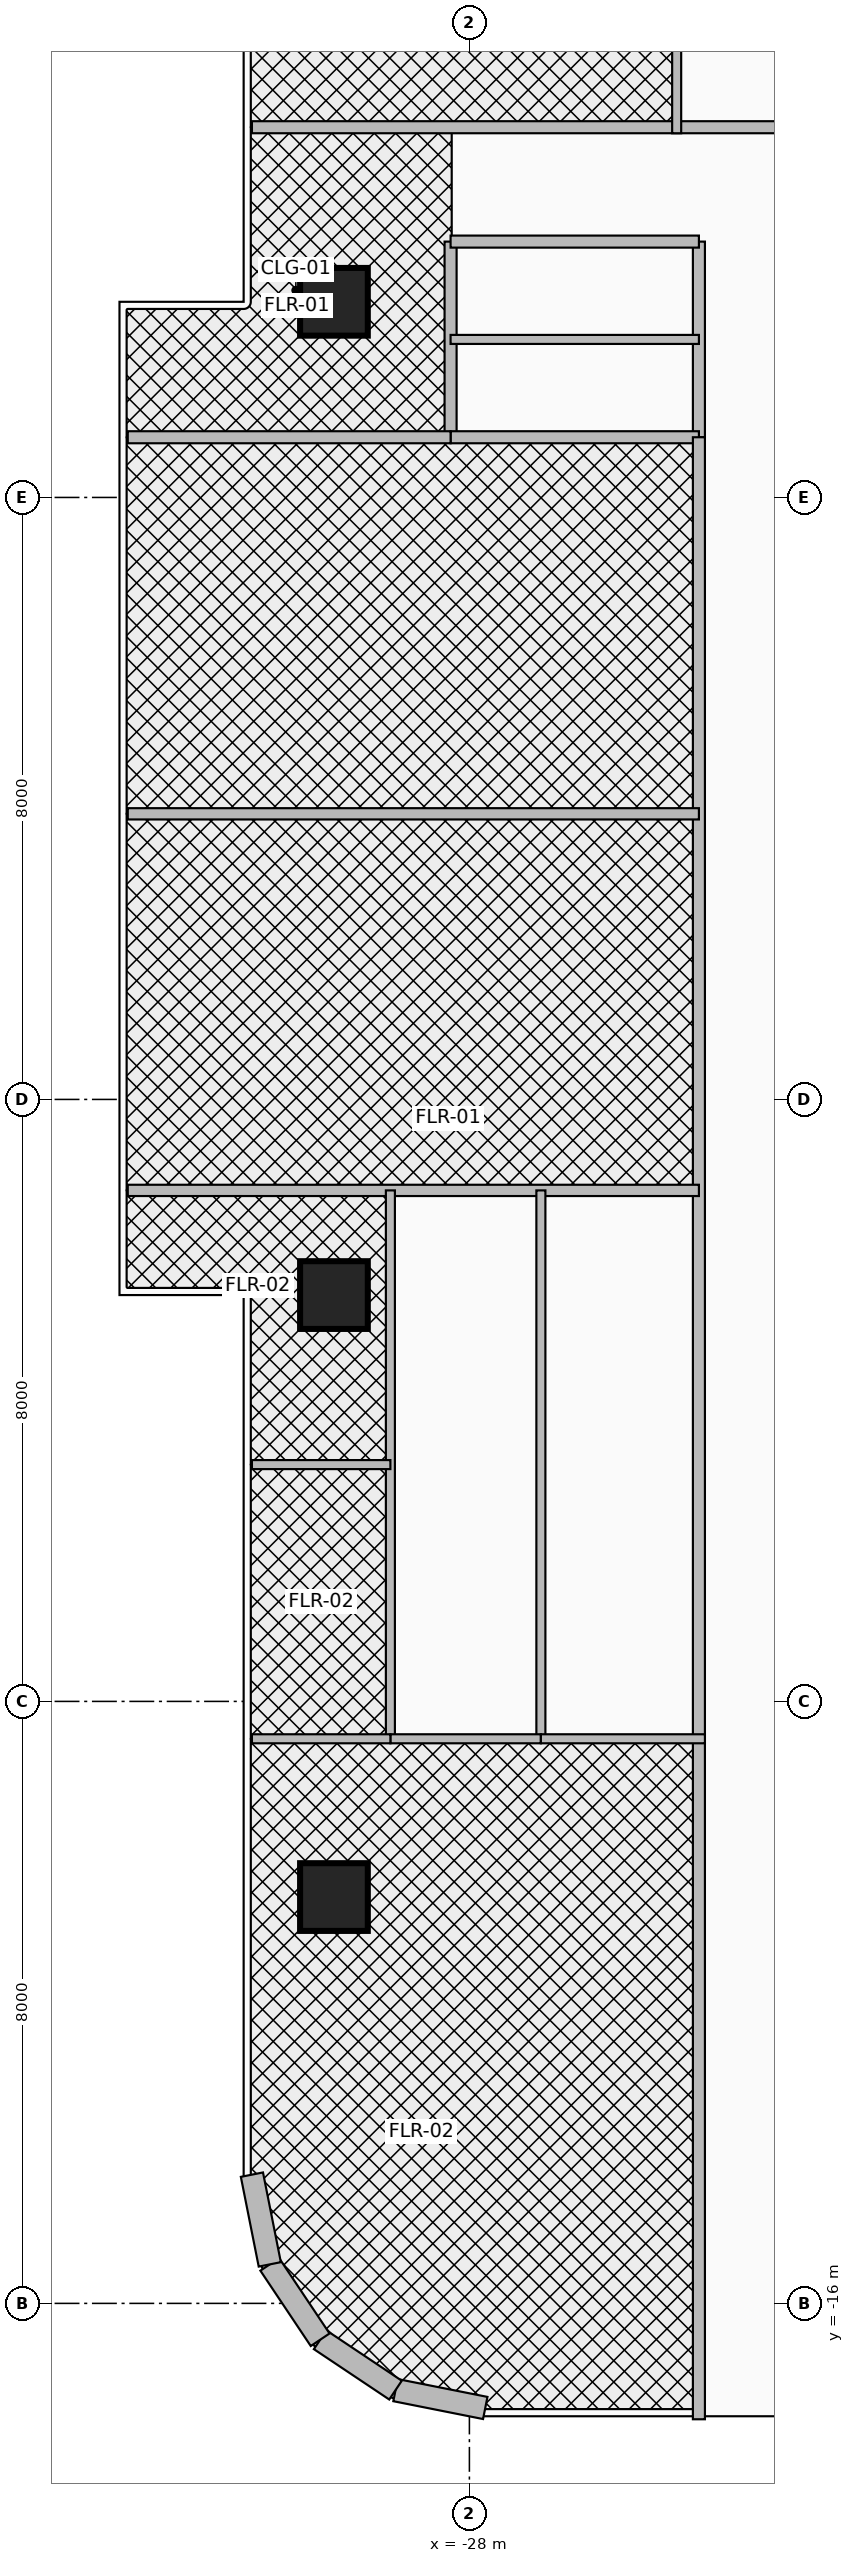
"""IFC4 building model, lengths in metres.
Left out: names, types, materials, properties, quantities, classifications, styles, units other than length and angle.
Written with IfcOpenShell. Run it as: python <this file> out.ifc"""

import sys

from ifc_helpers import new_model, si_unit, direction, frame, frame_2d, origin, origin_2d, place, context, subcontext, project, spatial, rectangle, extrude, source, transform, mapped, element, fill, save


model = new_model("IFC4")
c1 = context("Model", 3, precision=1e-05, world=origin(), true_north=direction((0.0, 1.0)))
c2 = subcontext(c1, "Body", "Model", "MODEL_VIEW")
j1 = project(units=[si_unit("LENGTHUNIT", "METRE"), si_unit("PLANEANGLEUNIT", "RADIAN")], contexts=[c1])
p1 = place(None, origin())
s1 = spatial("IfcSite", under=j1, at=p1, CompositionType="ELEMENT")
p2 = place(p1, origin())
s2 = spatial("IfcBuilding", under=s1, at=p2, CompositionType="ELEMENT")
p3 = place(p2, frame((0.0, 0.0, 209.0)))
s3 = spatial("IfcBuildingStorey", under=s2, at=p3, CompositionType="ELEMENT", Elevation=209.0)
m1 = source(origin(), c2, "Body", "SweptSolid", [
    extrude(rectangle(XDim=0.9, YDim=0.9, at=origin_2d()), origin(), (0.0, 0.0, 1.0), 3.5),
])
for number, where, z_axis, x_axis in (
    (1, (-29.8, -10.6, 0.0), (0.0, 0.0, 1.0), (1.0, 0.0, 0.0)),
    (2, (-29.8, -2.6, 0.0), (0.0, 0.0, 1.0), (1.0, 0.0, 0.0)),
    (3, (-29.8, 10.6, 0.0), (0.0, 0.0, 1.0), (1.0, 0.0, 0.0)),
):
    element("IfcColumn", number, at=place(p3, frame(where, z_axis=z_axis, x_axis=x_axis)), inside=s3, PredefinedType="COLUMN", context=c2, shape_type="MappedRepresentation", body=[
        mapped(m1, transform((0.0, 0.0, 0.0), x_axis=(1.0, 0.0, 0.0), y_axis=(0.0, 1.0, 0.0), z_axis=(0.0, 0.0, 1.0), scale=1.0)),
    ])
p4 = place(p3, frame((-27.789, -17.39, 0.0), z_axis=(0.0, 0.0, 1.0), x_axis=(-0.980804027463, 0.194996050505, 0.0)))
e4 = element("IfcWall", 4, at=p4, inside=s3, PredefinedType="SOLIDWALL", context=c2, shape_type="SweptSolid", body=[
    extrude(rectangle(XDim=1.216, YDim=0.3, at=frame_2d((0.608, 0.0))), origin(), (0.0, 0.0, 1.0), 3.26),
])
for number, where, z_axis, x_axis in (
    (5, (-28.982, -17.153, 0.0), (0.0, 0.0, 1.0), (-0.831, 0.556, 0.0)),
    (6, (-29.983, -16.483, 0.0), (0.0, 0.0, 1.0), (-0.556, 0.831, 0.0)),
):
    element("IfcWall", number, at=place(p3, frame(where, z_axis=z_axis, x_axis=x_axis)), inside=s3, PredefinedType="SOLIDWALL", context=c2, shape_type="SweptSolid", body=[
        extrude(rectangle(XDim=1.205, YDim=0.3, at=frame_2d((0.603, 0.0))), origin(), (0.0, 0.0, 1.0), 3.26),
    ])
p5 = place(p3, frame((-30.653, -15.482, 0.0), z_axis=(0.0, 0.0, 1.0), x_axis=(-0.194996050505, 0.980804027463, 0.0)))
e7 = element("IfcWall", 7, at=p5, inside=s3, PredefinedType="SOLIDWALL", context=c2, shape_type="SweptSolid", body=[
    extrude(rectangle(XDim=1.216, YDim=0.3, at=frame_2d((0.608, 0.0))), origin(), (0.0, 0.0, 1.0), 3.26),
])
p6 = place(p3, frame((-28.25, 8.8, 0.0), z_axis=(0.0, 0.0, 1.0), x_axis=(0.0, 1.0, 0.0)))
e8 = element("IfcWall", 8, at=p6, inside=s3, PredefinedType="PARTITIONING", context=c2, shape_type="SweptSolid", body=[
    extrude(rectangle(XDim=2.6, YDim=0.16, at=frame_2d((1.3, 0.0))), origin(), (0.0, 0.0, 1.0), 2.544),
])
p7 = place(p3, frame((-24.95, 8.8, 0.0), z_axis=(0.0, 0.0, 1.0), x_axis=(0.0, 1.0, 0.0)))
e9 = element("IfcWall", 9, at=p7, inside=s3, PredefinedType="PARTITIONING", context=c2, shape_type="SweptSolid", body=[
    extrude(rectangle(XDim=2.6, YDim=0.16, at=frame_2d((1.3, 0.0))), origin(), (0.0, 0.0, 1.0), 2.544),
])
p8 = place(p7, frame((0.3, 0.0, 0.0)))
e10 = element("IfcOpeningElement", 10, at=p8, cuts=e9, PredefinedType="OPENING", context=c2, shape_type="SweptSolid", body=[
    extrude(rectangle(XDim=0.85, YDim=2.1, at=frame_2d((0.425, 1.05))), frame((0.0, 0.095, 0.0), z_axis=(0.0, -1.0, 0.0), x_axis=(1.0, 0.0, 0.0)), (0.0, 0.0, 1.0), 0.19),
])
p9 = place(p7, frame((1.45, 0.0, 0.0)))
e11 = element("IfcOpeningElement", 11, at=p9, cuts=e9, PredefinedType="OPENING", context=c2, shape_type="SweptSolid", body=[
    extrude(rectangle(XDim=0.85, YDim=2.1, at=frame_2d((0.425, 1.05))), frame((0.0, 0.095, 0.0), z_axis=(0.0, -1.0, 0.0), x_axis=(1.0, 0.0, 0.0)), (0.0, 0.0, 1.0), 0.19),
])
for number, where, z_axis, x_axis in (
    (12, (-28.25, 8.8, 0.0), (0.0, 0.0, 1.0), (1.0, 0.0, 0.0)),
    (13, (-28.25, 11.4, 0.0), (0.0, 0.0, 1.0), (1.0, 0.0, 0.0)),
):
    element("IfcWall", number, at=place(p3, frame(where, z_axis=z_axis, x_axis=x_axis)), inside=s3, PredefinedType="PARTITIONING", context=c2, shape_type="SweptSolid", body=[
        extrude(rectangle(XDim=3.3, YDim=0.16, at=frame_2d((1.65, 0.0))), origin(), (0.0, 0.0, 1.0), 3.26),
    ])
p10 = place(p3, frame((-28.25, 10.1, 0.0), z_axis=(0.0, 0.0, 1.0), x_axis=(1.0, 0.0, 0.0)))
e14 = element("IfcWall", 14, at=p10, inside=s3, PredefinedType="PARTITIONING", context=c2, shape_type="SweptSolid", body=[
    extrude(rectangle(XDim=3.3, YDim=0.12, at=frame_2d((1.65, 0.0))), origin(), (0.0, 0.0, 1.0), 3.26),
])
p11 = place(p3, frame((-24.95, -17.54, 0.0), z_axis=(0.0, 0.0, 1.0), x_axis=(0.0, 1.0, 0.0)))
e15 = element("IfcWall", 15, at=p11, inside=s3, PredefinedType="PARTITIONING", context=c2, shape_type="SweptSolid", body=[
    extrude(rectangle(XDim=26.34, YDim=0.16, at=frame_2d((13.17, 0.0))), origin(), (0.0, 0.0, 1.0), 2.544),
])
p12 = place(p11, frame((4.122, 0.0, 0.0)))
e16 = element("IfcOpeningElement", 16, at=p12, cuts=e15, PredefinedType="OPENING", context=c2, shape_type="SweptSolid", body=[
    extrude(rectangle(XDim=0.95, YDim=2.15, at=frame_2d((0.475, 1.075))), frame((0.0, 0.095, 0.0), z_axis=(0.0, -1.0, 0.0), x_axis=(1.0, 0.0, 0.0)), (0.0, 0.0, 1.0), 0.19),
])
p13 = place(p11, frame((18.383, 0.0, 0.0)))
e17 = element("IfcOpeningElement", 17, at=p13, cuts=e15, PredefinedType="OPENING", context=c2, shape_type="SweptSolid", body=[
    extrude(rectangle(XDim=0.9, YDim=2.1, at=frame_2d((0.45, 1.05))), frame((0.0, 0.095, 0.0), z_axis=(0.0, -1.0, 0.0), x_axis=(1.0, 0.0, 0.0)), (0.0, 0.0, 1.0), 0.19),
])
p14 = place(p11, frame((23.388, 0.0, 0.0)))
e18 = element("IfcOpeningElement", 18, at=p14, cuts=e15, PredefinedType="OPENING", context=c2, shape_type="SweptSolid", body=[
    extrude(rectangle(XDim=0.9, YDim=2.1, at=frame_2d((0.45, 1.05))), frame((0.0, 0.095, 0.0), z_axis=(0.0, -1.0, 0.0), x_axis=(1.0, 0.0, 0.0)), (0.0, 0.0, 1.0), 0.19),
])
p15 = place(p3, frame((-32.54, 8.8, 0.0), z_axis=(0.0, 0.0, 1.0), x_axis=(1.0, 0.0, 0.0)))
e19 = element("IfcWall", 19, at=p15, inside=s3, PredefinedType="PARTITIONING", context=c2, shape_type="SweptSolid", body=[
    extrude(rectangle(XDim=4.29, YDim=0.16, at=frame_2d((2.145, 0.0))), origin(), (0.0, 0.0, 1.0), 2.706),
])
p16 = place(p15, frame((1.28, 0.0, 0.0)))
e20 = element("IfcOpeningElement", 20, at=p16, cuts=e19, PredefinedType="OPENING", context=c2, shape_type="SweptSolid", body=[
    extrude(rectangle(XDim=0.9, YDim=2.1, at=frame_2d((0.45, 1.05))), frame((0.0, 0.095, 0.0), z_axis=(0.0, -1.0, 0.0), x_axis=(1.0, 0.0, 0.0)), (0.0, 0.0, 1.0), 0.19),
])
p17 = place(p3, frame((-32.54, -1.209, 0.0), z_axis=(0.0, 0.0, 1.0), x_axis=(1.0, 0.0, 0.0)))
e21 = element("IfcWall", 21, at=p17, inside=s3, PredefinedType="PARTITIONING", context=c2, shape_type="SweptSolid", body=[
    extrude(rectangle(XDim=7.59, YDim=0.15, at=frame_2d((3.795, 0.0))), origin(), (0.0, 0.0, 1.0), 2.706),
])
for number, where, z_axis, x_axis in (
    (22, (-27.05, -8.497, 0.0), (0.0, 0.0, 1.0), (0.0, 1.0, 0.0)),
    (23, (-29.05, -8.497, 0.0), (0.0, 0.0, 1.0), (0.0, 1.0, 0.0)),
):
    element("IfcWall", number, at=place(p3, frame(where, z_axis=z_axis, x_axis=x_axis)), inside=s3, PredefinedType="PARTITIONING", context=c2, shape_type="SweptSolid", body=[
        extrude(rectangle(XDim=7.288, YDim=0.12, at=frame_2d((3.644, 0.0))), origin(), (0.0, 0.0, 1.0), 2.544),
    ])
p18 = place(p3, frame((-29.05, -8.497, 0.0), z_axis=(0.0, 0.0, 1.0), x_axis=(1.0, 0.0, 0.0)))
e24 = element("IfcWall", 24, at=p18, inside=s3, PredefinedType="PARTITIONING", context=c2, shape_type="SweptSolid", body=[
    extrude(rectangle(XDim=2.0, YDim=0.12, at=frame_2d((1.0, 0.0))), origin(), (0.0, 0.0, 1.0), 2.788),
])
p19 = place(p18, frame((0.575, 0.0, 0.0)))
e25 = element("IfcOpeningElement", 25, at=p19, cuts=e24, PredefinedType="OPENING", context=c2, shape_type="SweptSolid", body=[
    extrude(rectangle(XDim=0.85, YDim=2.1, at=frame_2d((0.425, 1.05))), frame((0.0, 0.075, 0.0), z_axis=(0.0, -1.0, 0.0), x_axis=(1.0, 0.0, 0.0)), (0.0, 0.0, 1.0), 0.15),
])
p20 = place(p3, frame((-27.05, -8.497, 0.0), z_axis=(0.0, 0.0, 1.0), x_axis=(1.0, 0.0, 0.0)))
e26 = element("IfcWall", 26, at=p20, inside=s3, PredefinedType="PARTITIONING", context=c2, shape_type="SweptSolid", body=[
    extrude(rectangle(XDim=2.18, YDim=0.12, at=frame_2d((1.09, 0.0))), origin(), (0.0, 0.0, 1.0), 2.788),
])
p21 = place(p20, frame((0.6, 0.0, 0.0)))
e27 = element("IfcOpeningElement", 27, at=p21, cuts=e26, PredefinedType="OPENING", context=c2, shape_type="SweptSolid", body=[
    extrude(rectangle(XDim=0.9, YDim=2.1, at=frame_2d((0.45, 1.05))), frame((0.0, 0.075, 0.0), z_axis=(0.0, -1.0, 0.0), x_axis=(1.0, 0.0, 0.0)), (0.0, 0.0, 1.0), 0.15),
])
p22 = place(p3, frame((-30.89, -8.497, 0.0), z_axis=(0.0, 0.0, 1.0), x_axis=(1.0, 0.0, 0.0)))
e28 = element("IfcWall", 28, at=p22, inside=s3, PredefinedType="PARTITIONING", context=c2, shape_type="SweptSolid", body=[
    extrude(rectangle(XDim=1.84, YDim=0.12, at=frame_2d((0.92, 0.0))), origin(), (0.0, 0.0, 1.0), 2.706),
])
p23 = place(p22, frame((0.47, 0.0, 0.0)))
e29 = element("IfcOpeningElement", 29, at=p23, cuts=e28, PredefinedType="OPENING", context=c2, shape_type="SweptSolid", body=[
    extrude(rectangle(XDim=0.9, YDim=2.1, at=frame_2d((0.45, 1.05))), frame((0.0, 0.075, 0.0), z_axis=(0.0, -1.0, 0.0), x_axis=(1.0, 0.0, 0.0)), (0.0, 0.0, 1.0), 0.15),
])
p24 = place(p3, frame((-30.89, -4.853, 0.0), z_axis=(0.0, 0.0, 1.0), x_axis=(1.0, 0.0, 0.0)))
e30 = element("IfcWall", 30, at=p24, inside=s3, PredefinedType="PARTITIONING", context=c2, shape_type="SweptSolid", body=[
    extrude(rectangle(XDim=1.84, YDim=0.12, at=frame_2d((0.92, 0.0))), origin(), (0.0, 0.0, 1.0), 2.706),
])
p25 = place(p24, frame((0.64, 0.0, 0.0)))
e31 = element("IfcOpeningElement", 31, at=p25, cuts=e30, PredefinedType="OPENING", context=c2, shape_type="SweptSolid", body=[
    extrude(rectangle(XDim=0.9, YDim=2.1, at=frame_2d((0.45, 1.05))), frame((0.0, 0.075, 0.0), z_axis=(0.0, -1.0, 0.0), x_axis=(1.0, 0.0, 0.0)), (0.0, 0.0, 1.0), 0.15),
])
p26 = place(p3, frame((-32.54, 3.795, 0.0), z_axis=(0.0, 0.0, 1.0), x_axis=(1.0, 0.0, 0.0)))
e32 = element("IfcWall", 32, at=p26, inside=s3, PredefinedType="PARTITIONING", context=c2, shape_type="SweptSolid", body=[
    extrude(rectangle(XDim=7.59, YDim=0.15, at=frame_2d((3.795, 0.0))), origin(), (0.0, 0.0, 1.0), 2.706),
])
p27 = place(p3, frame((-30.89, 12.92, 0.0), z_axis=(0.0, 0.0, 1.0), x_axis=(1.0, 0.0, 0.0)))
e33 = element("IfcWall", 33, at=p27, inside=s3, PredefinedType="PARTITIONING", context=c2, shape_type="SweptSolid", body=[
    extrude(rectangle(XDim=31.28, YDim=0.16, at=frame_2d((15.64, 0.0))), origin(), (0.0, 0.0, 1.0), 2.634),
])
p28 = place(p27, frame((2.347, 0.0, 0.0)))
e34 = element("IfcOpeningElement", 34, at=p28, cuts=e33, PredefinedType="OPENING", context=c2, shape_type="SweptSolid", body=[
    extrude(rectangle(XDim=0.95, YDim=2.15, at=frame_2d((0.475, 1.075))), frame((0.0, 0.095, 0.0), z_axis=(0.0, -1.0, 0.0), x_axis=(1.0, 0.0, 0.0)), (0.0, 0.0, 1.0), 0.19),
])
p29 = place(p27, frame((22.56, 0.0, 0.0)))
e35 = element("IfcOpeningElement", 35, at=p29, cuts=e33, PredefinedType="OPENING", context=c2, shape_type="SweptSolid", body=[
    extrude(rectangle(XDim=1.8, YDim=2.15, at=frame_2d((0.9, 1.075))), frame((0.0, 0.095, 0.0), z_axis=(0.0, -1.0, 0.0), x_axis=(1.0, 0.0, 0.0)), (0.0, 0.0, 1.0), 0.19),
])
p30 = place(p3, frame((-25.246, 12.84, 0.0), z_axis=(0.0, 0.0, 1.0), x_axis=(0.0, 1.0, 0.0)))
e36 = element("IfcWall", 36, at=p30, inside=s3, PredefinedType="PARTITIONING", context=c2, shape_type="SweptSolid", body=[
    extrude(rectangle(XDim=2.08, YDim=0.12, at=frame_2d((1.04, 0.0))), origin(), (0.0, 0.0, 1.0), 2.544),
])
p31 = place(p30, frame((0.55, 0.0, 0.0)))
e37 = element("IfcOpeningElement", 37, at=p31, cuts=e36, PredefinedType="OPENING", context=c2, shape_type="SweptSolid", body=[
    extrude(rectangle(XDim=0.9, YDim=2.1, at=frame_2d((0.45, 1.05))), frame((0.0, 0.075, 0.0), z_axis=(0.0, -1.0, 0.0), x_axis=(1.0, 0.0, 0.0)), (0.0, 0.0, 1.0), 0.15),
])
p32 = place(p8, origin())
e38 = element("IfcDoor", 38, at=p32, inside=s3, OperationType="SINGLE_SWING_RIGHT", PredefinedType="DOOR", context=c2, shape_type="SweptSolid", body=[
    extrude(rectangle(XDim=0.85, YDim=2.1, at=frame_2d((0.425, 1.05))), frame((0.0, 0.025, 0.0), z_axis=(0.0, -1.0, 0.0), x_axis=(1.0, 0.0, 0.0)), (0.0, 0.0, 1.0), 0.05),
])
fill(e10, e38)
p33 = place(p9, origin())
e39 = element("IfcDoor", 39, at=p33, inside=s3, OperationType="SINGLE_SWING_LEFT", PredefinedType="DOOR", context=c2, shape_type="SweptSolid", body=[
    extrude(rectangle(XDim=0.85, YDim=2.1, at=frame_2d((0.425, 1.05))), frame((0.0, 0.025, 0.0), z_axis=(0.0, -1.0, 0.0), x_axis=(1.0, 0.0, 0.0)), (0.0, 0.0, 1.0), 0.05),
])
fill(e11, e39)
p34 = place(p16, origin())
e40 = element("IfcDoor", 40, at=p34, inside=s3, OperationType="SINGLE_SWING_RIGHT", PredefinedType="DOOR", context=c2, shape_type="SweptSolid", body=[
    extrude(rectangle(XDim=0.9, YDim=2.1, at=frame_2d((0.45, 1.05))), frame((0.0, 0.025, 0.0), z_axis=(0.0, -1.0, 0.0), x_axis=(1.0, 0.0, 0.0)), (0.0, 0.0, 1.0), 0.05),
])
fill(e20, e40)
p35 = place(p12, frame((0.95, 0.0, 0.0), z_axis=(0.0, 0.0, 1.0), x_axis=(-1.0, 0.0, 0.0)))
e41 = element("IfcDoor", 41, at=p35, inside=s3, OperationType="SINGLE_SWING_LEFT", PredefinedType="DOOR", context=c2, shape_type="SweptSolid", body=[
    extrude(rectangle(XDim=0.95, YDim=2.15, at=frame_2d((0.475, 1.075))), frame((0.0, 0.025, 0.0), z_axis=(0.0, -1.0, 0.0), x_axis=(1.0, 0.0, 0.0)), (0.0, 0.0, 1.0), 0.05),
])
fill(e16, e41)
p36 = place(p19, origin())
e42 = element("IfcDoor", 42, at=p36, inside=s3, OperationType="SINGLE_SWING_RIGHT", PredefinedType="DOOR", context=c2, shape_type="SweptSolid", body=[
    extrude(rectangle(XDim=0.85, YDim=2.1, at=frame_2d((0.425, 1.05))), frame((0.0, 0.025, 0.0), z_axis=(0.0, -1.0, 0.0), x_axis=(1.0, 0.0, 0.0)), (0.0, 0.0, 1.0), 0.05),
])
fill(e25, e42)
p37 = place(p21, origin())
e43 = element("IfcDoor", 43, at=p37, inside=s3, OperationType="SINGLE_SWING_LEFT", PredefinedType="DOOR", context=c2, shape_type="SweptSolid", body=[
    extrude(rectangle(XDim=0.9, YDim=2.1, at=frame_2d((0.45, 1.05))), frame((0.0, 0.025, 0.0), z_axis=(0.0, -1.0, 0.0), x_axis=(1.0, 0.0, 0.0)), (0.0, 0.0, 1.0), 0.05),
])
fill(e27, e43)
p38 = place(p23, origin())
e44 = element("IfcDoor", 44, at=p38, inside=s3, OperationType="SINGLE_SWING_RIGHT", PredefinedType="DOOR", context=c2, shape_type="SweptSolid", body=[
    extrude(rectangle(XDim=0.9, YDim=2.1, at=frame_2d((0.45, 1.05))), frame((0.0, 0.025, 0.0), z_axis=(0.0, -1.0, 0.0), x_axis=(1.0, 0.0, 0.0)), (0.0, 0.0, 1.0), 0.05),
])
fill(e29, e44)
p39 = place(p25, frame((0.9, 0.0, 0.0), z_axis=(0.0, 0.0, 1.0), x_axis=(-1.0, 0.0, 0.0)))
e45 = element("IfcDoor", 45, at=p39, inside=s3, OperationType="SINGLE_SWING_LEFT", PredefinedType="DOOR", context=c2, shape_type="SweptSolid", body=[
    extrude(rectangle(XDim=0.9, YDim=2.1, at=frame_2d((0.45, 1.05))), frame((0.0, 0.025, 0.0), z_axis=(0.0, -1.0, 0.0), x_axis=(1.0, 0.0, 0.0)), (0.0, 0.0, 1.0), 0.05),
])
fill(e31, e45)
p40 = place(p13, origin())
e46 = element("IfcDoor", 46, at=p40, inside=s3, OperationType="SINGLE_SWING_RIGHT", PredefinedType="DOOR", context=c2, shape_type="SweptSolid", body=[
    extrude(rectangle(XDim=0.9, YDim=2.1, at=frame_2d((0.45, 1.05))), frame((0.0, 0.025, 0.0), z_axis=(0.0, -1.0, 0.0), x_axis=(1.0, 0.0, 0.0)), (0.0, 0.0, 1.0), 0.05),
])
fill(e17, e46)
p41 = place(p14, frame((0.9, 0.0, 0.0), z_axis=(0.0, 0.0, 1.0), x_axis=(-1.0, 0.0, 0.0)))
e47 = element("IfcDoor", 47, at=p41, inside=s3, OperationType="SINGLE_SWING_LEFT", PredefinedType="DOOR", context=c2, shape_type="SweptSolid", body=[
    extrude(rectangle(XDim=0.9, YDim=2.1, at=frame_2d((0.45, 1.05))), frame((0.0, 0.025, 0.0), z_axis=(0.0, -1.0, 0.0), x_axis=(1.0, 0.0, 0.0)), (0.0, 0.0, 1.0), 0.05),
])
fill(e18, e47)
p42 = place(p28, frame((0.95, 0.0, 0.0), z_axis=(0.0, 0.0, 1.0), x_axis=(-1.0, 0.0, 0.0)))
e48 = element("IfcDoor", 48, at=p42, inside=s3, OperationType="SINGLE_SWING_LEFT", PredefinedType="DOOR", context=c2, shape_type="SweptSolid", body=[
    extrude(rectangle(XDim=0.95, YDim=2.15, at=frame_2d((0.475, 1.075))), frame((0.0, 0.025, 0.0), z_axis=(0.0, -1.0, 0.0), x_axis=(1.0, 0.0, 0.0)), (0.0, 0.0, 1.0), 0.05),
])
fill(e34, e48)
p43 = place(p31, origin())
e49 = element("IfcDoor", 49, at=p43, inside=s3, OperationType="SINGLE_SWING_LEFT", PredefinedType="DOOR", context=c2, shape_type="SweptSolid", body=[
    extrude(rectangle(XDim=0.9, YDim=2.1, at=frame_2d((0.45, 1.05))), frame((0.0, 0.025, 0.0), z_axis=(0.0, -1.0, 0.0), x_axis=(1.0, 0.0, 0.0)), (0.0, 0.0, 1.0), 0.05),
])
fill(e37, e49)
save(model, sys.argv[1])
